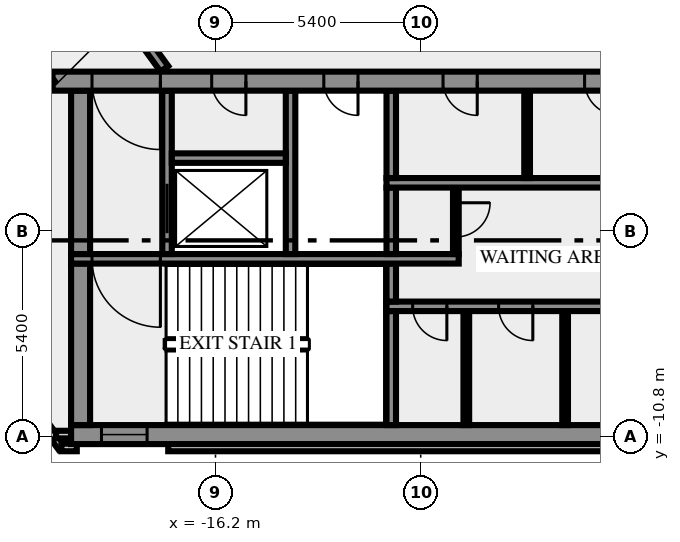
"""IFC4 building model, lengths in metres.
Left out: names, types, materials, properties, quantities, classifications, styles, units other than length and angle.
Written with IfcOpenShell. Run it as: python <this file> out.ifc"""

import sys

from ifc_helpers import new_model, si_unit, direction, frame, frame_2d, origin, place, context, subcontext, project, spatial, rectangle, extrude, element, fill, save


model = new_model("IFC4")
c1 = context("Model", 3, precision=1e-05, world=origin(), true_north=direction((0.0, 1.0)))
c2 = subcontext(c1, "Body", "Model", "MODEL_VIEW")
j1 = project(units=[si_unit("LENGTHUNIT", "METRE"), si_unit("PLANEANGLEUNIT", "RADIAN")], contexts=[c1])
p1 = place(None, origin())
s1 = spatial("IfcSite", under=j1, at=p1, CompositionType="ELEMENT")
p2 = place(p1, origin())
s2 = spatial("IfcBuilding", under=s1, at=p2, CompositionType="ELEMENT")
p3 = place(p2, frame((0.0, 0.0, 144.0)))
s3 = spatial("IfcBuildingStorey", under=s2, at=p3, CompositionType="ELEMENT", Elevation=144.0)
p4 = place(p3, frame((-21.833, -8.909, 0.0), z_axis=(0.0, 0.0, 1.0), x_axis=(0.587766567315, -0.809030569476, 0.0)))
e1 = element("IfcWall", 1, at=p4, inside=s3, PredefinedType="SOLIDWALL", context=c2, shape_type="SweptSolid", body=[
    extrude(rectangle(XDim=2.688, YDim=0.2, at=frame_2d((1.344, 0.0))), origin(), (0.0, 0.0, 1.0), 3.65),
])
p5 = place(p3, frame((-20.256, -11.088, 0.0), z_axis=(0.0, 0.0, 1.0), x_axis=(1.0, 0.0, 0.0)))
e2 = element("IfcWall", 2, at=p5, inside=s3, PredefinedType="SOLIDWALL", context=c2, shape_type="SweptSolid", body=[
    extrude(rectangle(XDim=0.406, YDim=0.2, at=frame_2d((0.203, 0.0))), origin(), (0.0, 0.0, 1.0), 3.65),
])
p6 = place(p3, frame((-17.444, -11.088, 0.0), z_axis=(0.0, 0.0, 1.0), x_axis=(1.0, 0.0, 0.0)))
e3 = element("IfcWall", 3, at=p6, inside=s3, PredefinedType="SOLIDWALL", context=c2, shape_type="SweptSolid", body=[
    extrude(rectangle(XDim=34.888, YDim=0.2, at=frame_2d((17.444, 0.0))), origin(), (0.0, 0.0, 1.0), 3.65),
])
p7 = place(p3, frame((-19.98, -10.75, 0.0), z_axis=(0.0, 0.0, 1.0), x_axis=(-1.0, 0.0, 0.0)))
e4 = element("IfcWall", 4, at=p7, inside=s3, PredefinedType="SOLIDWALL", context=c2, shape_type="SweptSolid", body=[
    extrude(rectangle(XDim=0.417, YDim=0.2, at=frame_2d((0.208, 0.0))), origin(), (0.0, 0.0, 1.0), 3.65),
])
p8 = place(p3, frame((-20.0, -10.75, 0.0), z_axis=(0.0, 0.0, 1.0), x_axis=(1.0, 0.0, 0.0)))
e5 = element("IfcWall", 5, at=p8, inside=s3, PredefinedType="SHEAR", context=c2, shape_type="SweptSolid", body=[
    extrude(rectangle(XDim=40.0, YDim=0.5, at=frame_2d((20.0, 0.0))), origin(), (0.0, 0.0, 1.0), 3.65),
])
p9 = place(p8, frame((0.8, 0.0, 1.0)))
e6 = element("IfcOpeningElement", 6, at=p9, cuts=e5, PredefinedType="OPENING", context=c2, shape_type="SweptSolid", body=[
    extrude(rectangle(XDim=1.2, YDim=1.2, at=frame_2d((0.6, 0.6))), frame((0.0, 0.26, 0.0), z_axis=(0.0, -1.0, 0.0), x_axis=(1.0, 0.0, 0.0)), (0.0, 0.0, 1.0), 0.52),
])
p10 = place(p8, frame((38.0, 0.0, 1.0)))
e7 = element("IfcOpeningElement", 7, at=p10, cuts=e5, PredefinedType="OPENING", context=c2, shape_type="SweptSolid", body=[
    extrude(rectangle(XDim=1.2, YDim=1.2, at=frame_2d((0.6, 0.6))), frame((0.0, 0.26, 0.0), z_axis=(0.0, -1.0, 0.0), x_axis=(1.0, 0.0, 0.0)), (0.0, 0.0, 1.0), 0.52),
])
p11 = place(p3, frame((-19.75, -10.5, 0.0), z_axis=(0.0, 0.0, 1.0), x_axis=(0.0, 1.0, 0.0)))
e8 = element("IfcWall", 8, at=p11, inside=s3, PredefinedType="SHEAR", context=c2, shape_type="SweptSolid", body=[
    extrude(rectangle(XDim=4.25, YDim=0.5, at=frame_2d((2.125, 0.0))), origin(), (0.0, 0.0, 1.0), 3.65),
])
p12 = place(p3, frame((-11.575, -10.5, 0.0), z_axis=(0.0, 0.0, 1.0), x_axis=(0.0, 1.0, 0.0)))
e9 = element("IfcWall", 9, at=p12, inside=s3, PredefinedType="SHEAR", context=c2, shape_type="SweptSolid", body=[
    extrude(rectangle(XDim=3.0, YDim=0.25, at=frame_2d((1.5, 0.0))), origin(), (0.0, 0.0, 1.0), 3.65),
])
for number, where, z_axis, x_axis in (
    (10, (-9.6, -10.5, 0.0), (0.0, 0.0, 1.0), (0.0, 1.0, 0.0)),
    (11, (-7.0, -10.5, 0.0), (0.0, 0.0, 1.0), (0.0, 1.0, 0.0)),
):
    element("IfcWall", number, at=place(p3, frame(where, z_axis=z_axis, x_axis=x_axis)), inside=s3, PredefinedType="PARTITIONING", context=c2, shape_type="SweptSolid", body=[
        extrude(rectangle(XDim=3.0, YDim=0.15, at=frame_2d((1.5, 0.0))), origin(), (0.0, 0.0, 1.0), 3.65),
    ])
p13 = place(p3, frame((11.7, -7.375, 0.0), z_axis=(0.0, 0.0, 1.0), x_axis=(-1.0, 0.0, 0.0)))
e12 = element("IfcWall", 12, at=p13, inside=s3, PredefinedType="SHEAR", context=c2, shape_type="SweptSolid", body=[
    extrude(rectangle(XDim=23.4, YDim=0.25, at=frame_2d((11.7, 0.0))), origin(), (0.0, 0.0, 1.0), 3.65),
])
p14 = place(p13, frame((21.812, 0.0, 0.0)))
e13 = element("IfcOpeningElement", 13, at=p14, cuts=e12, PredefinedType="OPENING", context=c2, shape_type="SweptSolid", body=[
    extrude(rectangle(XDim=0.9, YDim=2.1, at=frame_2d((0.45, 1.05))), frame((0.0, 0.135, 0.0), z_axis=(0.0, -1.0, 0.0), x_axis=(1.0, 0.0, 0.0)), (0.0, 0.0, 1.0), 0.27),
])
p15 = place(p13, frame((19.55, 0.0, 0.0)))
e14 = element("IfcOpeningElement", 14, at=p15, cuts=e12, PredefinedType="OPENING", context=c2, shape_type="SweptSolid", body=[
    extrude(rectangle(XDim=0.9, YDim=2.1, at=frame_2d((0.45, 1.05))), frame((0.0, 0.135, 0.0), z_axis=(0.0, -1.0, 0.0), x_axis=(1.0, 0.0, 0.0)), (0.0, 0.0, 1.0), 0.27),
])
p16 = place(p13, frame((16.787, 0.0, 0.0)))
e15 = element("IfcOpeningElement", 15, at=p16, cuts=e12, PredefinedType="OPENING", context=c2, shape_type="SweptSolid", body=[
    extrude(rectangle(XDim=0.9, YDim=2.1, at=frame_2d((0.45, 1.05))), frame((0.0, 0.135, 0.0), z_axis=(0.0, -1.0, 0.0), x_axis=(1.0, 0.0, 0.0)), (0.0, 0.0, 1.0), 0.27),
])
p17 = place(p13, frame((14.55, 0.0, 0.0)))
e16 = element("IfcOpeningElement", 16, at=p17, cuts=e12, PredefinedType="OPENING", context=c2, shape_type="SweptSolid", body=[
    extrude(rectangle(XDim=0.8, YDim=2.1, at=frame_2d((0.4, 1.05))), frame((0.0, 0.135, 0.0), z_axis=(0.0, -1.0, 0.0), x_axis=(1.0, 0.0, 0.0)), (0.0, 0.0, 1.0), 0.27),
])
p18 = place(p13, frame((12.8, 0.0, 0.0)))
e17 = element("IfcOpeningElement", 17, at=p18, cuts=e12, PredefinedType="OPENING", context=c2, shape_type="SweptSolid", body=[
    extrude(rectangle(XDim=0.9, YDim=2.1, at=frame_2d((0.45, 1.05))), frame((0.0, 0.135, 0.0), z_axis=(0.0, -1.0, 0.0), x_axis=(1.0, 0.0, 0.0)), (0.0, 0.0, 1.0), 0.27),
])
p19 = place(p13, frame((10.7, 0.0, 0.0)))
e18 = element("IfcOpeningElement", 18, at=p19, cuts=e12, PredefinedType="OPENING", context=c2, shape_type="SweptSolid", body=[
    extrude(rectangle(XDim=0.9, YDim=2.1, at=frame_2d((0.45, 1.05))), frame((0.0, 0.135, 0.0), z_axis=(0.0, -1.0, 0.0), x_axis=(1.0, 0.0, 0.0)), (0.0, 0.0, 1.0), 0.27),
])
p20 = place(p13, frame((8.35, 0.0, 0.0)))
e19 = element("IfcOpeningElement", 19, at=p20, cuts=e12, PredefinedType="OPENING", context=c2, shape_type="SweptSolid", body=[
    extrude(rectangle(XDim=1.1, YDim=2.1, at=frame_2d((0.55, 1.05))), frame((0.0, 0.135, 0.0), z_axis=(0.0, -1.0, 0.0), x_axis=(1.0, 0.0, 0.0)), (0.0, 0.0, 1.0), 0.27),
])
p21 = place(p13, frame((5.85, 0.0, 0.0)))
e20 = element("IfcOpeningElement", 20, at=p21, cuts=e12, PredefinedType="OPENING", context=c2, shape_type="SweptSolid", body=[
    extrude(rectangle(XDim=1.1, YDim=2.1, at=frame_2d((0.55, 1.05))), frame((0.0, 0.135, 0.0), z_axis=(0.0, -1.0, 0.0), x_axis=(1.0, 0.0, 0.0)), (0.0, 0.0, 1.0), 0.27),
])
p22 = place(p13, frame((3.35, 0.0, 0.0)))
e21 = element("IfcOpeningElement", 21, at=p22, cuts=e12, PredefinedType="OPENING", context=c2, shape_type="SweptSolid", body=[
    extrude(rectangle(XDim=1.1, YDim=2.1, at=frame_2d((0.55, 1.05))), frame((0.0, 0.135, 0.0), z_axis=(0.0, -1.0, 0.0), x_axis=(1.0, 0.0, 0.0)), (0.0, 0.0, 1.0), 0.27),
])
p23 = place(p13, frame((0.85, 0.0, 0.0)))
e22 = element("IfcOpeningElement", 22, at=p23, cuts=e12, PredefinedType="OPENING", context=c2, shape_type="SweptSolid", body=[
    extrude(rectangle(XDim=1.1, YDim=2.1, at=frame_2d((0.55, 1.05))), frame((0.0, 0.135, 0.0), z_axis=(0.0, -1.0, 0.0), x_axis=(1.0, 0.0, 0.0)), (0.0, 0.0, 1.0), 0.27),
])
p24 = place(p3, frame((-11.575, -7.25, 0.0), z_axis=(0.0, 0.0, 1.0), x_axis=(0.0, 1.0, 0.0)))
e23 = element("IfcWall", 23, at=p24, inside=s3, PredefinedType="SHEAR", context=c2, shape_type="SweptSolid", body=[
    extrude(rectangle(XDim=1.0, YDim=0.25, at=frame_2d((0.5, 0.0))), origin(), (0.0, 0.0, 1.0), 3.65),
])
p25 = place(p3, frame((-9.8, -6.125, 0.0), z_axis=(0.0, 0.0, 1.0), x_axis=(-1.0, 0.0, 0.0)))
e24 = element("IfcWall", 24, at=p25, inside=s3, PredefinedType="SHEAR", context=c2, shape_type="SweptSolid", body=[
    extrude(rectangle(XDim=10.2, YDim=0.25, at=frame_2d((5.1, 0.0))), origin(), (0.0, 0.0, 1.0), 3.65),
])
p26 = place(p25, frame((7.85, 0.0, 0.0)))
e25 = element("IfcOpeningElement", 25, at=p26, cuts=e24, PredefinedType="OPENING", context=c2, shape_type="SweptSolid", body=[
    extrude(rectangle(XDim=1.8, YDim=2.1, at=frame_2d((0.9, 1.05))), frame((0.0, 0.135, 0.0), z_axis=(0.0, -1.0, 0.0), x_axis=(1.0, 0.0, 0.0)), (0.0, 0.0, 1.0), 0.27),
])
p27 = place(p3, frame((-19.75, -6.0, 0.0), z_axis=(0.0, 0.0, 1.0), x_axis=(0.0, 1.0, 0.0)))
e26 = element("IfcWall", 26, at=p27, inside=s3, PredefinedType="SHEAR", context=c2, shape_type="SweptSolid", body=[
    extrude(rectangle(XDim=4.3, YDim=0.5, at=frame_2d((2.15, 0.0))), origin(), (0.0, 0.0, 1.0), 3.65),
])
p28 = place(p3, frame((-17.475, -6.0, 0.0), z_axis=(0.0, 0.0, 1.0), x_axis=(0.0, 1.0, 0.0)))
e27 = element("IfcWall", 27, at=p28, inside=s3, PredefinedType="SHEAR", context=c2, shape_type="SweptSolid", body=[
    extrude(rectangle(XDim=4.3, YDim=0.25, at=frame_2d((2.15, 0.0))), origin(), (0.0, 0.0, 1.0), 3.65),
])
p29 = place(p28, frame((0.55, 0.0, 0.0)))
e28 = element("IfcOpeningElement", 28, at=p29, cuts=e27, PredefinedType="OPENING", context=c2, shape_type="SweptSolid", body=[
    extrude(rectangle(XDim=1.3, YDim=2.1, at=frame_2d((0.65, 1.05))), frame((0.0, 0.135, 0.0), z_axis=(0.0, -1.0, 0.0), x_axis=(1.0, 0.0, 0.0)), (0.0, 0.0, 1.0), 0.27),
])
p30 = place(p3, frame((-14.225, -6.0, 0.0), z_axis=(0.0, 0.0, 1.0), x_axis=(0.0, 1.0, 0.0)))
e29 = element("IfcWall", 29, at=p30, inside=s3, PredefinedType="SHEAR", context=c2, shape_type="SweptSolid", body=[
    extrude(rectangle(XDim=4.3, YDim=0.25, at=frame_2d((2.15, 0.0))), origin(), (0.0, 0.0, 1.0), 3.65),
])
p31 = place(p3, frame((-11.575, -6.0, 0.0), z_axis=(0.0, 0.0, 1.0), x_axis=(0.0, 1.0, 0.0)))
e30 = element("IfcWall", 30, at=p31, inside=s3, PredefinedType="SHEAR", context=c2, shape_type="SweptSolid", body=[
    extrude(rectangle(XDim=1.75, YDim=0.25, at=frame_2d((0.875, 0.0))), origin(), (0.0, 0.0, 1.0), 3.65),
])
p32 = place(p3, frame((-9.875, -4.25, 0.0), z_axis=(0.0, 0.0, 1.0), x_axis=(0.0, -1.0, 0.0)))
e31 = element("IfcWall", 31, at=p32, inside=s3, PredefinedType="PARTITIONING", context=c2, shape_type="SweptSolid", body=[
    extrude(rectangle(XDim=1.75, YDim=0.15, at=frame_2d((0.875, 0.0))), origin(), (0.0, 0.0, 1.0), 3.65),
])
p33 = place(p32, frame((0.4, 0.0, 0.0)))
e32 = element("IfcOpeningElement", 32, at=p33, cuts=e31, PredefinedType="OPENING", context=c2, shape_type="SweptSolid", body=[
    extrude(rectangle(XDim=0.9, YDim=2.1, at=frame_2d((0.45, 1.05))), frame((0.0, 0.085, 0.0), z_axis=(0.0, -1.0, 0.0), x_axis=(1.0, 0.0, 0.0)), (0.0, 0.0, 1.0), 0.17),
])
p34 = place(p3, frame((-11.7, -4.125, 0.0), z_axis=(0.0, 0.0, 1.0), x_axis=(1.0, 0.0, 0.0)))
e33 = element("IfcWall", 33, at=p34, inside=s3, PredefinedType="SHEAR", context=c2, shape_type="SweptSolid", body=[
    extrude(rectangle(XDim=10.05, YDim=0.25, at=frame_2d((5.025, 0.0))), origin(), (0.0, 0.0, 1.0), 3.65),
])
p35 = place(p3, frame((-11.575, -4.0, 0.0), z_axis=(0.0, 0.0, 1.0), x_axis=(0.0, 1.0, 0.0)))
e34 = element("IfcWall", 34, at=p35, inside=s3, PredefinedType="SHEAR", context=c2, shape_type="SweptSolid", body=[
    extrude(rectangle(XDim=2.3, YDim=0.25, at=frame_2d((1.15, 0.0))), origin(), (0.0, 0.0, 1.0), 3.65),
])
p36 = place(p3, frame((-8.0, -4.0, 0.0), z_axis=(0.0, 0.0, 1.0), x_axis=(0.0, 1.0, 0.0)))
e35 = element("IfcWall", 35, at=p36, inside=s3, PredefinedType="PARTITIONING", context=c2, shape_type="SweptSolid", body=[
    extrude(rectangle(XDim=2.3, YDim=0.15, at=frame_2d((1.15, 0.0))), origin(), (0.0, 0.0, 1.0), 3.65),
])
p37 = place(p3, frame((-17.35, -3.475, 0.0), z_axis=(0.0, 0.0, 1.0), x_axis=(1.0, 0.0, 0.0)))
e36 = element("IfcWall", 36, at=p37, inside=s3, PredefinedType="SHEAR", context=c2, shape_type="SweptSolid", body=[
    extrude(rectangle(XDim=3.0, YDim=0.25, at=frame_2d((1.5, 0.0))), origin(), (0.0, 0.0, 1.0), 3.65),
])
p38 = place(p3, frame((20.49, -1.45, 0.0), z_axis=(0.0, 0.0, 1.0), x_axis=(-1.0, 0.0, 0.0)))
e37 = element("IfcWall", 37, at=p38, inside=s3, PredefinedType="SHEAR", context=c2, shape_type="SweptSolid", body=[
    extrude(rectangle(XDim=40.98, YDim=0.5, at=frame_2d((20.49, 0.0))), origin(), (0.0, 0.0, 1.0), 3.65),
])
p39 = place(p38, frame((38.14, 0.0, 0.0)))
e38 = element("IfcOpeningElement", 38, at=p39, cuts=e37, PredefinedType="OPENING", context=c2, shape_type="SweptSolid", body=[
    extrude(rectangle(XDim=1.8, YDim=2.1, at=frame_2d((0.9, 1.05))), frame((0.0, 0.26, 0.0), z_axis=(0.0, -1.0, 0.0), x_axis=(1.0, 0.0, 0.0)), (0.0, 0.0, 1.0), 0.52),
])
p40 = place(p38, frame((35.89, 0.0, 0.0)))
e39 = element("IfcOpeningElement", 39, at=p40, cuts=e37, PredefinedType="OPENING", context=c2, shape_type="SweptSolid", body=[
    extrude(rectangle(XDim=0.9, YDim=2.1, at=frame_2d((0.45, 1.05))), frame((0.0, 0.26, 0.0), z_axis=(0.0, -1.0, 0.0), x_axis=(1.0, 0.0, 0.0)), (0.0, 0.0, 1.0), 0.52),
])
p41 = place(p38, frame((32.94, 0.0, 0.0)))
e40 = element("IfcOpeningElement", 40, at=p41, cuts=e37, PredefinedType="OPENING", context=c2, shape_type="SweptSolid", body=[
    extrude(rectangle(XDim=0.9, YDim=2.1, at=frame_2d((0.45, 1.05))), frame((0.0, 0.26, 0.0), z_axis=(0.0, -1.0, 0.0), x_axis=(1.0, 0.0, 0.0)), (0.0, 0.0, 1.0), 0.52),
])
p42 = place(p38, frame((29.802, 0.0, 0.0)))
e41 = element("IfcOpeningElement", 41, at=p42, cuts=e37, PredefinedType="OPENING", context=c2, shape_type="SweptSolid", body=[
    extrude(rectangle(XDim=0.9, YDim=2.1, at=frame_2d((0.45, 1.05))), frame((0.0, 0.26, 0.0), z_axis=(0.0, -1.0, 0.0), x_axis=(1.0, 0.0, 0.0)), (0.0, 0.0, 1.0), 0.52),
])
p43 = place(p38, frame((26.077, 0.0, 0.0)))
e42 = element("IfcOpeningElement", 42, at=p43, cuts=e37, PredefinedType="OPENING", context=c2, shape_type="SweptSolid", body=[
    extrude(rectangle(XDim=0.9, YDim=2.1, at=frame_2d((0.45, 1.05))), frame((0.0, 0.26, 0.0), z_axis=(0.0, -1.0, 0.0), x_axis=(1.0, 0.0, 0.0)), (0.0, 0.0, 1.0), 0.52),
])
p44 = place(p38, frame((19.59, 0.0, 0.0)))
e43 = element("IfcOpeningElement", 43, at=p44, cuts=e37, PredefinedType="OPENING", context=c2, shape_type="SweptSolid", body=[
    extrude(rectangle(XDim=2.0, YDim=2.1, at=frame_2d((1.0, 1.05))), frame((0.0, 0.26, 0.0), z_axis=(0.0, -1.0, 0.0), x_axis=(1.0, 0.0, 0.0)), (0.0, 0.0, 1.0), 0.52),
])
p45 = place(p38, frame((7.14, 0.0, 0.0)))
e44 = element("IfcOpeningElement", 44, at=p45, cuts=e37, PredefinedType="OPENING", context=c2, shape_type="SweptSolid", body=[
    extrude(rectangle(XDim=0.9, YDim=2.1, at=frame_2d((0.45, 1.05))), frame((0.0, 0.26, 0.0), z_axis=(0.0, -1.0, 0.0), x_axis=(1.0, 0.0, 0.0)), (0.0, 0.0, 1.0), 0.52),
])
p46 = place(p38, frame((5.028, 0.0, 0.0)))
e45 = element("IfcOpeningElement", 45, at=p46, cuts=e37, PredefinedType="OPENING", context=c2, shape_type="SweptSolid", body=[
    extrude(rectangle(XDim=0.8, YDim=2.1, at=frame_2d((0.4, 1.05))), frame((0.0, 0.26, 0.0), z_axis=(0.0, -1.0, 0.0), x_axis=(1.0, 0.0, 0.0)), (0.0, 0.0, 1.0), 0.52),
])
p47 = place(p38, frame((3.452, 0.0, 0.0)))
e46 = element("IfcOpeningElement", 46, at=p47, cuts=e37, PredefinedType="OPENING", context=c2, shape_type="SweptSolid", body=[
    extrude(rectangle(XDim=0.8, YDim=2.1, at=frame_2d((0.4, 1.05))), frame((0.0, 0.26, 0.0), z_axis=(0.0, -1.0, 0.0), x_axis=(1.0, 0.0, 0.0)), (0.0, 0.0, 1.0), 0.52),
])
p48 = place(p38, frame((1.04, 0.0, 0.0)))
e47 = element("IfcOpeningElement", 47, at=p48, cuts=e37, PredefinedType="OPENING", context=c2, shape_type="SweptSolid", body=[
    extrude(rectangle(XDim=1.8, YDim=2.1, at=frame_2d((0.9, 1.05))), frame((0.0, 0.26, 0.0), z_axis=(0.0, -1.0, 0.0), x_axis=(1.0, 0.0, 0.0)), (0.0, 0.0, 1.0), 0.52),
])
p49 = place(p3, frame((-20.531, -1.523, 0.0), z_axis=(0.0, 0.0, 1.0), x_axis=(-0.587785812891, 0.809016587076, 0.0)))
e48 = element("IfcWall", 48, at=p49, inside=s3, PredefinedType="SOLIDWALL", context=c2, shape_type="SweptSolid", body=[
    extrude(rectangle(XDim=28.67, YDim=0.25, at=frame_2d((14.335, 0.0))), origin(), (0.0, 0.0, 1.0), 3.65),
])
p50 = place(p49, frame((27.296, 0.0, 0.0)))
e49 = element("IfcOpeningElement", 49, at=p50, cuts=e48, PredefinedType="OPENING", context=c2, shape_type="SweptSolid", body=[
    extrude(rectangle(XDim=0.9, YDim=2.1, at=frame_2d((0.45, 1.05))), frame((0.0, 0.135, 0.0), z_axis=(0.0, -1.0, 0.0), x_axis=(1.0, 0.0, 0.0)), (0.0, 0.0, 1.0), 0.27),
])
p51 = place(p49, frame((11.866, 0.0, 0.0)))
e50 = element("IfcOpeningElement", 50, at=p51, cuts=e48, PredefinedType="OPENING", context=c2, shape_type="SweptSolid", body=[
    extrude(rectangle(XDim=0.9, YDim=2.1, at=frame_2d((0.45, 1.05))), frame((0.0, 0.135, 0.0), z_axis=(0.0, -1.0, 0.0), x_axis=(1.0, 0.0, 0.0)), (0.0, 0.0, 1.0), 0.27),
])
p52 = place(p49, frame((0.533, 0.0, 0.0)))
e51 = element("IfcOpeningElement", 51, at=p52, cuts=e48, PredefinedType="OPENING", context=c2, shape_type="SweptSolid", body=[
    extrude(rectangle(XDim=0.9, YDim=2.1, at=frame_2d((0.45, 1.05))), frame((0.0, 0.135, 0.0), z_axis=(0.0, -1.0, 0.0), x_axis=(1.0, 0.0, 0.0)), (0.0, 0.0, 1.0), 0.27),
])
p53 = place(p3, frame((-35.092, 23.027, 0.0), z_axis=(0.0, 0.0, 1.0), x_axis=(0.587784076945, -0.809017848313, 0.0)))
e52 = element("IfcWall", 52, at=p53, inside=s3, PredefinedType="SOLIDWALL", context=c2, shape_type="SweptSolid", body=[
    extrude(rectangle(XDim=29.853, YDim=0.25, at=frame_2d((14.927, 0.0))), origin(), (0.0, 0.0, 1.0), 3.65),
])
p54 = place(p53, frame((0.224, 0.0, 0.0)))
e53 = element("IfcOpeningElement", 53, at=p54, cuts=e52, PredefinedType="OPENING", context=c2, shape_type="SweptSolid", body=[
    extrude(rectangle(XDim=0.9, YDim=2.1, at=frame_2d((0.45, 1.05))), frame((0.0, 0.135, 0.0), z_axis=(0.0, -1.0, 0.0), x_axis=(1.0, 0.0, 0.0)), (0.0, 0.0, 1.0), 0.27),
])
p55 = place(p53, frame((25.512, 0.0, 0.0)))
e54 = element("IfcOpeningElement", 54, at=p55, cuts=e52, PredefinedType="OPENING", context=c2, shape_type="SweptSolid", body=[
    extrude(rectangle(XDim=0.9, YDim=2.1, at=frame_2d((0.45, 1.05))), frame((0.0, 0.135, 0.0), z_axis=(0.0, -1.0, 0.0), x_axis=(1.0, 0.0, 0.0)), (0.0, 0.0, 1.0), 0.27),
])
p56 = place(p9, origin())
e55 = element("IfcWindow", 55, at=p56, inside=s3, PartitioningType="SINGLE_PANEL", PredefinedType="WINDOW", context=c2, shape_type="SweptSolid", body=[
    extrude(rectangle(XDim=1.2, YDim=1.2, at=frame_2d((0.6, 0.6))), frame((0.0, 0.03, 0.0), z_axis=(0.0, -1.0, 0.0), x_axis=(1.0, 0.0, 0.0)), (0.0, 0.0, 1.0), 0.06),
])
fill(e6, e55)
p57 = place(p14, origin())
e56 = element("IfcDoor", 56, at=p57, inside=s3, OperationType="SINGLE_SWING_RIGHT", PredefinedType="DOOR", context=c2, shape_type="SweptSolid", body=[
    extrude(rectangle(XDim=0.9, YDim=2.1, at=frame_2d((0.45, 1.05))), frame((0.0, 0.025, 0.0), z_axis=(0.0, -1.0, 0.0), x_axis=(1.0, 0.0, 0.0)), (0.0, 0.0, 1.0), 0.05),
])
fill(e13, e56)
p58 = place(p15, origin())
e57 = element("IfcDoor", 57, at=p58, inside=s3, OperationType="SINGLE_SWING_RIGHT", PredefinedType="DOOR", context=c2, shape_type="SweptSolid", body=[
    extrude(rectangle(XDim=0.9, YDim=2.1, at=frame_2d((0.45, 1.05))), frame((0.0, 0.025, 0.0), z_axis=(0.0, -1.0, 0.0), x_axis=(1.0, 0.0, 0.0)), (0.0, 0.0, 1.0), 0.05),
])
fill(e14, e57)
p59 = place(p26, origin())
e58 = element("IfcDoor", 58, at=p59, inside=s3, OperationType="DOUBLE_DOOR_SINGLE_SWING", PredefinedType="DOOR", context=c2, shape_type="SweptSolid", body=[
    extrude(rectangle(XDim=1.8, YDim=2.1, at=frame_2d((0.9, 1.05))), frame((0.0, 0.025, 0.0), z_axis=(0.0, -1.0, 0.0), x_axis=(1.0, 0.0, 0.0)), (0.0, 0.0, 1.0), 0.05),
])
fill(e25, e58)
p60 = place(p29, origin())
e59 = element("IfcDoor", 59, at=p60, inside=s3, OperationType="DOUBLE_DOOR_SLIDING", PredefinedType="DOOR", context=c2, shape_type="SweptSolid", body=[
    extrude(rectangle(XDim=1.3, YDim=2.1, at=frame_2d((0.65, 1.05))), frame((0.0, 0.025, 0.0), z_axis=(0.0, -1.0, 0.0), x_axis=(1.0, 0.0, 0.0)), (0.0, 0.0, 1.0), 0.05),
])
fill(e28, e59)
p61 = place(p33, origin())
e60 = element("IfcDoor", 60, at=p61, inside=s3, OperationType="SINGLE_SWING_LEFT", PredefinedType="DOOR", context=c2, shape_type="SweptSolid", body=[
    extrude(rectangle(XDim=0.9, YDim=2.1, at=frame_2d((0.45, 1.05))), frame((0.0, 0.025, 0.0), z_axis=(0.0, -1.0, 0.0), x_axis=(1.0, 0.0, 0.0)), (0.0, 0.0, 1.0), 0.05),
])
fill(e32, e60)
p62 = place(p39, origin())
e61 = element("IfcDoor", 61, at=p62, inside=s3, OperationType="DOUBLE_DOOR_SINGLE_SWING", PredefinedType="DOOR", context=c2, shape_type="SweptSolid", body=[
    extrude(rectangle(XDim=1.8, YDim=2.1, at=frame_2d((0.9, 1.05))), frame((0.0, 0.025, 0.0), z_axis=(0.0, -1.0, 0.0), x_axis=(1.0, 0.0, 0.0)), (0.0, 0.0, 1.0), 0.05),
])
fill(e38, e61)
p63 = place(p40, origin())
e62 = element("IfcDoor", 62, at=p63, inside=s3, OperationType="SINGLE_SWING_RIGHT", PredefinedType="DOOR", context=c2, shape_type="SweptSolid", body=[
    extrude(rectangle(XDim=0.9, YDim=2.1, at=frame_2d((0.45, 1.05))), frame((0.0, 0.025, 0.0), z_axis=(0.0, -1.0, 0.0), x_axis=(1.0, 0.0, 0.0)), (0.0, 0.0, 1.0), 0.05),
])
fill(e39, e62)
p64 = place(p41, origin())
e63 = element("IfcDoor", 63, at=p64, inside=s3, OperationType="SINGLE_SWING_RIGHT", PredefinedType="DOOR", context=c2, shape_type="SweptSolid", body=[
    extrude(rectangle(XDim=0.9, YDim=2.1, at=frame_2d((0.45, 1.05))), frame((0.0, 0.025, 0.0), z_axis=(0.0, -1.0, 0.0), x_axis=(1.0, 0.0, 0.0)), (0.0, 0.0, 1.0), 0.05),
])
fill(e40, e63)
p65 = place(p42, origin())
e64 = element("IfcDoor", 64, at=p65, inside=s3, OperationType="SINGLE_SWING_RIGHT", PredefinedType="DOOR", context=c2, shape_type="SweptSolid", body=[
    extrude(rectangle(XDim=0.9, YDim=2.1, at=frame_2d((0.45, 1.05))), frame((0.0, 0.025, 0.0), z_axis=(0.0, -1.0, 0.0), x_axis=(1.0, 0.0, 0.0)), (0.0, 0.0, 1.0), 0.05),
])
fill(e41, e64)
p66 = place(p43, origin())
e65 = element("IfcDoor", 65, at=p66, inside=s3, OperationType="SINGLE_SWING_RIGHT", PredefinedType="DOOR", context=c2, shape_type="SweptSolid", body=[
    extrude(rectangle(XDim=0.9, YDim=2.1, at=frame_2d((0.45, 1.05))), frame((0.0, 0.025, 0.0), z_axis=(0.0, -1.0, 0.0), x_axis=(1.0, 0.0, 0.0)), (0.0, 0.0, 1.0), 0.05),
])
fill(e42, e65)
save(model, sys.argv[1])
